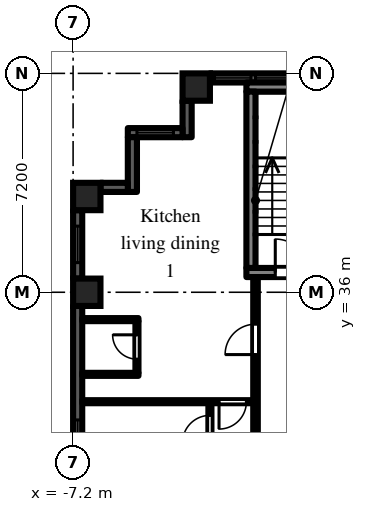
"""IFC4 building model, lengths in metres.
Left out: names, types, materials, properties, quantities, classifications, styles, units other than length and angle.
Written with IfcOpenShell. Run it as: python <this file> out.ifc"""

import sys

from ifc_helpers import new_model, si_unit, direction, frame, frame_2d, origin, origin_2d, place, context, subcontext, project, spatial, rectangle, extrude, element, fill, save


model = new_model("IFC4")
c1 = context("Model", 3, precision=1e-05, world=origin(), true_north=direction((0.0, 1.0)))
c2 = subcontext(c1, "Body", "Model", "MODEL_VIEW")
j1 = project(units=[si_unit("LENGTHUNIT", "METRE"), si_unit("PLANEANGLEUNIT", "RADIAN")], contexts=[c1])
p1 = place(None, origin())
s1 = spatial("IfcSite", under=j1, at=p1, CompositionType="ELEMENT")
p2 = place(p1, origin())
s2 = spatial("IfcBuilding", under=s1, at=p2, CompositionType="ELEMENT")
p3 = place(p2, frame((0.0, 0.0, 29.7)))
s3 = spatial("IfcBuildingStorey", under=s2, at=p3, CompositionType="ELEMENT", Elevation=29.7)
for number, where, z_axis, x_axis in (
    (1, (-6.75, 36.0, 0.0), (0.0, 0.0, 1.0), (1.0, 0.0, 0.0)),
    (2, (-6.75, 39.15, 0.0), (0.0, 0.0, 1.0), (1.0, 0.0, 0.0)),
    (3, (-3.15, 42.75, 0.0), (0.0, 0.0, 1.0), (1.0, 0.0, 0.0)),
):
    element("IfcColumn", number, at=place(p3, frame(where, z_axis=z_axis, x_axis=x_axis)), inside=s3, PredefinedType="COLUMN", context=c2, shape_type="SweptSolid", body=[
        extrude(rectangle(XDim=0.9, YDim=0.9, at=origin_2d()), origin(), (0.0, 0.0, 1.0), 3.0),
    ])
p4 = place(p3, frame((2.7, 43.05, 0.0), z_axis=(0.0, 0.0, 1.0), x_axis=(-1.0, 0.0, 0.0)))
e4 = element("IfcWall", 4, at=p4, inside=s3, PredefinedType="SOLIDWALL", context=c2, shape_type="SweptSolid", body=[
    extrude(rectangle(XDim=5.4, YDim=0.3, at=frame_2d((2.7, 0.0))), origin(), (0.0, 0.0, 1.0), 2.1),
])
p5 = place(p4, frame((1.5, 0.0, 0.2)))
e5 = element("IfcOpeningElement", 5, at=p5, cuts=e4, PredefinedType="OPENING", context=c2, shape_type="SweptSolid", body=[
    extrude(rectangle(XDim=2.4, YDim=1.85, at=frame_2d((1.2, 0.925))), frame((0.0, 0.16, 0.0), z_axis=(0.0, -1.0, 0.0), x_axis=(1.0, 0.0, 0.0)), (0.0, 0.0, 1.0), 0.32),
])
p6 = place(p4, frame((0.15, 0.0, 0.2)))
e6 = element("IfcOpeningElement", 6, at=p6, cuts=e4, PredefinedType="OPENING", context=c2, shape_type="SweptSolid", body=[
    extrude(rectangle(XDim=1.2, YDim=1.85, at=frame_2d((0.6, 0.925))), frame((0.0, 0.16, 0.0), z_axis=(0.0, -1.0, 0.0), x_axis=(1.0, 0.0, 0.0)), (0.0, 0.0, 1.0), 0.32),
])
p7 = place(p4, frame((4.05, 0.0, 0.2)))
e7 = element("IfcOpeningElement", 7, at=p7, cuts=e4, PredefinedType="OPENING", context=c2, shape_type="SweptSolid", body=[
    extrude(rectangle(XDim=1.2, YDim=1.85, at=frame_2d((0.6, 0.925))), frame((0.0, 0.16, 0.0), z_axis=(0.0, -1.0, 0.0), x_axis=(1.0, 0.0, 0.0)), (0.0, 0.0, 1.0), 0.32),
])
p8 = place(p3, frame((-3.45, 42.3, 0.0), z_axis=(0.0, 0.0, 1.0), x_axis=(0.0, -1.0, 0.0)))
e8 = element("IfcWall", 8, at=p8, inside=s3, PredefinedType="SOLIDWALL", context=c2, shape_type="SweptSolid", body=[
    extrude(rectangle(XDim=1.2, YDim=0.3, at=frame_2d((0.6, 0.0))), origin(), (0.0, 0.0, 1.0), 2.575),
])
p9 = place(p3, frame((-3.6, 41.25, 0.0), z_axis=(0.0, 0.0, 1.0), x_axis=(-1.0, 0.0, 0.0)))
e9 = element("IfcWall", 9, at=p9, inside=s3, PredefinedType="SOLIDWALL", context=c2, shape_type="SweptSolid", body=[
    extrude(rectangle(XDim=1.8, YDim=0.3, at=frame_2d((0.9, 0.0))), origin(), (0.0, 0.0, 1.0), 2.575),
])
p10 = place(p9, frame((0.3, 0.0, 0.2)))
e10 = element("IfcOpeningElement", 10, at=p10, cuts=e9, PredefinedType="OPENING", context=c2, shape_type="SweptSolid", body=[
    extrude(rectangle(XDim=1.2, YDim=1.85, at=frame_2d((0.6, 0.925))), frame((0.0, 0.16, 0.0), z_axis=(0.0, -1.0, 0.0), x_axis=(1.0, 0.0, 0.0)), (0.0, 0.0, 1.0), 0.32),
])
p11 = place(p3, frame((-5.25, 41.1, 0.0), z_axis=(0.0, 0.0, 1.0), x_axis=(0.0, -1.0, 0.0)))
e11 = element("IfcWall", 11, at=p11, inside=s3, PredefinedType="SOLIDWALL", context=c2, shape_type="SweptSolid", body=[
    extrude(rectangle(XDim=1.8, YDim=0.3, at=frame_2d((0.9, 0.0))), origin(), (0.0, 0.0, 1.0), 2.575),
])
p12 = place(p3, frame((-5.4, 39.45, 0.0), z_axis=(0.0, 0.0, 1.0), x_axis=(-1.0, 0.0, 0.0)))
e12 = element("IfcWall", 12, at=p12, inside=s3, PredefinedType="SOLIDWALL", context=c2, shape_type="SweptSolid", body=[
    extrude(rectangle(XDim=0.9, YDim=0.3, at=frame_2d((0.45, 0.0))), origin(), (0.0, 0.0, 1.0), 2.575),
])
p13 = place(p3, frame((-7.05, 38.7, 0.0), z_axis=(0.0, 0.0, 1.0), x_axis=(0.0, -1.0, 0.0)))
e13 = element("IfcWall", 13, at=p13, inside=s3, PredefinedType="SOLIDWALL", context=c2, shape_type="SweptSolid", body=[
    extrude(rectangle(XDim=2.25, YDim=0.3, at=frame_2d((1.125, 0.0))), origin(), (0.0, 0.0, 1.0), 2.1),
])
p14 = place(p13, frame((0.525, 0.0, 0.2)))
e14 = element("IfcOpeningElement", 14, at=p14, cuts=e13, PredefinedType="OPENING", context=c2, shape_type="SweptSolid", body=[
    extrude(rectangle(XDim=1.2, YDim=1.85, at=frame_2d((0.6, 0.925))), frame((0.0, 0.16, 0.0), z_axis=(0.0, -1.0, 0.0), x_axis=(1.0, 0.0, 0.0)), (0.0, 0.0, 1.0), 0.32),
])
p15 = place(p3, frame((-7.05, 35.55, 0.0), z_axis=(0.0, 0.0, 1.0), x_axis=(0.0, -1.0, 0.0)))
e15 = element("IfcWall", 15, at=p15, inside=s3, PredefinedType="SOLIDWALL", context=c2, shape_type="SweptSolid", body=[
    extrude(rectangle(XDim=6.3, YDim=0.3, at=frame_2d((3.15, 0.0))), origin(), (0.0, 0.0, 1.0), 2.1),
])
p16 = place(p15, frame((3.75, 0.0, 0.2)))
e16 = element("IfcOpeningElement", 16, at=p16, cuts=e15, PredefinedType="OPENING", context=c2, shape_type="SweptSolid", body=[
    extrude(rectangle(XDim=2.4, YDim=1.85, at=frame_2d((1.2, 0.925))), frame((0.0, 0.16, 0.0), z_axis=(0.0, -1.0, 0.0), x_axis=(1.0, 0.0, 0.0)), (0.0, 0.0, 1.0), 0.32),
])
p17 = place(p3, frame((-1.5, 36.65, 0.0), z_axis=(0.0, 0.0, 1.0), x_axis=(1.0, 0.0, 0.0)))
e17 = element("IfcWall", 17, at=p17, inside=s3, PredefinedType="SHEAR", context=c2, shape_type="SweptSolid", body=[
    extrude(rectangle(XDim=3.0, YDim=0.3, at=frame_2d((1.5, 0.0))), origin(), (0.0, 0.0, 1.0), 2.575),
])
p18 = place(p17, frame((0.95, 0.0, 0.0)))
e18 = element("IfcOpeningElement", 18, at=p18, cuts=e17, PredefinedType="OPENING", context=c2, shape_type="SweptSolid", body=[
    extrude(rectangle(XDim=1.1, YDim=2.1, at=frame_2d((0.55, 1.05))), frame((0.0, 0.16, 0.0), z_axis=(0.0, -1.0, 0.0), x_axis=(1.0, 0.0, 0.0)), (0.0, 0.0, 1.0), 0.32),
])
p19 = place(p3, frame((-1.5, 42.75, 0.0), z_axis=(0.0, 0.0, 1.0), x_axis=(1.0, 0.0, 0.0)))
e19 = element("IfcWall", 19, at=p19, inside=s3, PredefinedType="SHEAR", context=c2, shape_type="SweptSolid", body=[
    extrude(rectangle(XDim=3.0, YDim=0.3, at=frame_2d((1.5, 0.0))), origin(), (0.0, 0.0, 1.0), 2.575),
])
p20 = place(p3, frame((-1.35, 36.8, 0.0), z_axis=(0.0, 0.0, 1.0), x_axis=(0.0, 1.0, 0.0)))
e20 = element("IfcWall", 20, at=p20, inside=s3, PredefinedType="SHEAR", context=c2, shape_type="SweptSolid", body=[
    extrude(rectangle(XDim=5.8, YDim=0.3, at=frame_2d((2.9, 0.0))), origin(), (0.0, 0.0, 1.0), 2.575),
])
p21 = place(p3, frame((-6.9, 32.4, 0.0), z_axis=(0.0, 0.0, 1.0), x_axis=(1.0, 0.0, 0.0)))
e21 = element("IfcWall", 21, at=p21, inside=s3, PredefinedType="PARTITIONING", context=c2, shape_type="SweptSolid", body=[
    extrude(rectangle(XDim=5.625, YDim=0.1, at=frame_2d((2.812, 0.0))), origin(), (0.0, 0.0, 1.0), 2.575),
])
p22 = place(p21, frame((4.5, 0.0, 0.0)))
e22 = element("IfcOpeningElement", 22, at=p22, cuts=e21, PredefinedType="OPENING", context=c2, shape_type="SweptSolid", body=[
    extrude(rectangle(XDim=0.9, YDim=2.1, at=frame_2d((0.45, 1.05))), frame((0.0, 0.06, 0.0), z_axis=(0.0, -1.0, 0.0), x_axis=(1.0, 0.0, 0.0)), (0.0, 0.0, 1.0), 0.12),
])
for number, where, z_axis, x_axis in (
    (23, (-6.9, 33.3, 0.0), (0.0, 0.0, 1.0), (1.0, 0.0, 0.0)),
    (24, (-6.9, 35.1, 0.0), (0.0, 0.0, 1.0), (1.0, 0.0, 0.0)),
):
    element("IfcWall", number, at=place(p3, frame(where, z_axis=z_axis, x_axis=x_axis)), inside=s3, PredefinedType="PARTITIONING", context=c2, shape_type="SweptSolid", body=[
        extrude(rectangle(XDim=1.85, YDim=0.1, at=frame_2d((0.925, 0.0))), origin(), (0.0, 0.0, 1.0), 2.575),
    ])
p23 = place(p3, frame((-5.1, 33.35, 0.0), z_axis=(0.0, 0.0, 1.0), x_axis=(0.0, 1.0, 0.0)))
e25 = element("IfcWall", 25, at=p23, inside=s3, PredefinedType="PARTITIONING", context=c2, shape_type="SweptSolid", body=[
    extrude(rectangle(XDim=1.7, YDim=0.1, at=frame_2d((0.85, 0.0))), origin(), (0.0, 0.0, 1.0), 2.575),
])
p24 = place(p23, frame((0.45, 0.0, 0.0)))
e26 = element("IfcOpeningElement", 26, at=p24, cuts=e25, PredefinedType="OPENING", context=c2, shape_type="SweptSolid", body=[
    extrude(rectangle(XDim=0.8, YDim=2.1, at=frame_2d((0.4, 1.05))), frame((0.0, 0.06, 0.0), z_axis=(0.0, -1.0, 0.0), x_axis=(1.0, 0.0, 0.0)), (0.0, 0.0, 1.0), 0.12),
])
p25 = place(p3, frame((-2.7, 18.05, 0.0), z_axis=(0.0, 0.0, 1.0), x_axis=(0.0, 1.0, 0.0)))
e27 = element("IfcWall", 27, at=p25, inside=s3, PredefinedType="PARTITIONING", context=c2, shape_type="SweptSolid", body=[
    extrude(rectangle(XDim=14.3, YDim=0.1, at=frame_2d((7.15, 0.0))), origin(), (0.0, 0.0, 1.0), 2.575),
])
p26 = place(p25, frame((0.4, 0.0, 0.0)))
e28 = element("IfcOpeningElement", 28, at=p26, cuts=e27, PredefinedType="OPENING", context=c2, shape_type="SweptSolid", body=[
    extrude(rectangle(XDim=0.9, YDim=2.1, at=frame_2d((0.45, 1.05))), frame((0.0, 0.06, 0.0), z_axis=(0.0, -1.0, 0.0), x_axis=(1.0, 0.0, 0.0)), (0.0, 0.0, 1.0), 0.12),
])
p27 = place(p25, frame((5.8, 0.0, 0.0)))
e29 = element("IfcOpeningElement", 29, at=p27, cuts=e27, PredefinedType="OPENING", context=c2, shape_type="SweptSolid", body=[
    extrude(rectangle(XDim=0.9, YDim=2.1, at=frame_2d((0.45, 1.05))), frame((0.0, 0.06, 0.0), z_axis=(0.0, -1.0, 0.0), x_axis=(1.0, 0.0, 0.0)), (0.0, 0.0, 1.0), 0.12),
])
p28 = place(p25, frame((7.6, 0.0, 0.0)))
e30 = element("IfcOpeningElement", 30, at=p28, cuts=e27, PredefinedType="OPENING", context=c2, shape_type="SweptSolid", body=[
    extrude(rectangle(XDim=0.9, YDim=2.1, at=frame_2d((0.45, 1.05))), frame((0.0, 0.06, 0.0), z_axis=(0.0, -1.0, 0.0), x_axis=(1.0, 0.0, 0.0)), (0.0, 0.0, 1.0), 0.12),
])
p29 = place(p25, frame((13.0, 0.0, 0.0)))
e31 = element("IfcOpeningElement", 31, at=p29, cuts=e27, PredefinedType="OPENING", context=c2, shape_type="SweptSolid", body=[
    extrude(rectangle(XDim=0.9, YDim=2.1, at=frame_2d((0.45, 1.05))), frame((0.0, 0.06, 0.0), z_axis=(0.0, -1.0, 0.0), x_axis=(1.0, 0.0, 0.0)), (0.0, 0.0, 1.0), 0.12),
])
p30 = place(p3, frame((-1.2, 1.125, 0.0), z_axis=(0.0, 0.0, 1.0), x_axis=(0.0, 1.0, 0.0)))
e32 = element("IfcWall", 32, at=p30, inside=s3, PredefinedType="PARTITIONING", context=c2, shape_type="SweptSolid", body=[
    extrude(rectangle(XDim=35.375, YDim=0.15, at=frame_2d((17.688, 0.0))), origin(), (0.0, 0.0, 1.0), 2.575),
])
p31 = place(p30, frame((2.625, 0.0, 0.0)))
e33 = element("IfcOpeningElement", 33, at=p31, cuts=e32, PredefinedType="OPENING", context=c2, shape_type="SweptSolid", body=[
    extrude(rectangle(XDim=0.9, YDim=2.1, at=frame_2d((0.45, 1.05))), frame((0.0, 0.085, 0.0), z_axis=(0.0, -1.0, 0.0), x_axis=(1.0, 0.0, 0.0)), (0.0, 0.0, 1.0), 0.17),
])
p32 = place(p30, frame((11.025, 0.0, 0.0)))
e34 = element("IfcOpeningElement", 34, at=p32, cuts=e32, PredefinedType="OPENING", context=c2, shape_type="SweptSolid", body=[
    extrude(rectangle(XDim=0.9, YDim=2.1, at=frame_2d((0.45, 1.05))), frame((0.0, 0.085, 0.0), z_axis=(0.0, -1.0, 0.0), x_axis=(1.0, 0.0, 0.0)), (0.0, 0.0, 1.0), 0.17),
])
p33 = place(p30, frame((14.625, 0.0, 0.0)))
e35 = element("IfcOpeningElement", 35, at=p33, cuts=e32, PredefinedType="OPENING", context=c2, shape_type="SweptSolid", body=[
    extrude(rectangle(XDim=0.9, YDim=2.1, at=frame_2d((0.45, 1.05))), frame((0.0, 0.085, 0.0), z_axis=(0.0, -1.0, 0.0), x_axis=(1.0, 0.0, 0.0)), (0.0, 0.0, 1.0), 0.17),
])
p34 = place(p30, frame((32.825, 0.0, 0.0)))
e36 = element("IfcOpeningElement", 36, at=p34, cuts=e32, PredefinedType="OPENING", context=c2, shape_type="SweptSolid", body=[
    extrude(rectangle(XDim=1.0, YDim=2.1, at=frame_2d((0.5, 1.05))), frame((0.0, 0.085, 0.0), z_axis=(0.0, -1.0, 0.0), x_axis=(1.0, 0.0, 0.0)), (0.0, 0.0, 1.0), 0.17),
])
p35 = place(p5, origin())
e37 = element("IfcWindow", 37, at=p35, inside=s3, PartitioningType="SINGLE_PANEL", PredefinedType="WINDOW", context=c2, shape_type="SweptSolid", body=[
    extrude(rectangle(XDim=2.4, YDim=1.85, at=frame_2d((1.2, 0.925))), frame((0.0, 0.03, 0.0), z_axis=(0.0, -1.0, 0.0), x_axis=(1.0, 0.0, 0.0)), (0.0, 0.0, 1.0), 0.06),
])
fill(e5, e37)
p36 = place(p7, origin())
e38 = element("IfcWindow", 38, at=p36, inside=s3, PartitioningType="SINGLE_PANEL", PredefinedType="WINDOW", context=c2, shape_type="SweptSolid", body=[
    extrude(rectangle(XDim=1.2, YDim=1.85, at=frame_2d((0.6, 0.925))), frame((0.0, 0.03, 0.0), z_axis=(0.0, -1.0, 0.0), x_axis=(1.0, 0.0, 0.0)), (0.0, 0.0, 1.0), 0.06),
])
fill(e7, e38)
p37 = place(p10, origin())
e39 = element("IfcWindow", 39, at=p37, inside=s3, PartitioningType="SINGLE_PANEL", PredefinedType="WINDOW", context=c2, shape_type="SweptSolid", body=[
    extrude(rectangle(XDim=1.2, YDim=1.85, at=frame_2d((0.6, 0.925))), frame((0.0, 0.03, 0.0), z_axis=(0.0, -1.0, 0.0), x_axis=(1.0, 0.0, 0.0)), (0.0, 0.0, 1.0), 0.06),
])
fill(e10, e39)
p38 = place(p14, origin())
e40 = element("IfcWindow", 40, at=p38, inside=s3, PartitioningType="SINGLE_PANEL", PredefinedType="WINDOW", context=c2, shape_type="SweptSolid", body=[
    extrude(rectangle(XDim=1.2, YDim=1.85, at=frame_2d((0.6, 0.925))), frame((0.0, 0.03, 0.0), z_axis=(0.0, -1.0, 0.0), x_axis=(1.0, 0.0, 0.0)), (0.0, 0.0, 1.0), 0.06),
])
fill(e14, e40)
p39 = place(p16, origin())
e41 = element("IfcWindow", 41, at=p39, inside=s3, PartitioningType="SINGLE_PANEL", PredefinedType="WINDOW", context=c2, shape_type="SweptSolid", body=[
    extrude(rectangle(XDim=2.4, YDim=1.85, at=frame_2d((1.2, 0.925))), frame((0.0, 0.03, 0.0), z_axis=(0.0, -1.0, 0.0), x_axis=(1.0, 0.0, 0.0)), (0.0, 0.0, 1.0), 0.06),
])
fill(e16, e41)
p40 = place(p18, origin())
e42 = element("IfcDoor", 42, at=p40, inside=s3, OperationType="SINGLE_SWING_LEFT", PredefinedType="DOOR", context=c2, shape_type="SweptSolid", body=[
    extrude(rectangle(XDim=1.1, YDim=2.1, at=frame_2d((0.55, 1.05))), frame((0.0, 0.025, 0.0), z_axis=(0.0, -1.0, 0.0), x_axis=(1.0, 0.0, 0.0)), (0.0, 0.0, 1.0), 0.05),
])
fill(e18, e42)
p41 = place(p24, origin())
e43 = element("IfcDoor", 43, at=p41, inside=s3, OperationType="SINGLE_SWING_RIGHT", PredefinedType="DOOR", context=c2, shape_type="SweptSolid", body=[
    extrude(rectangle(XDim=0.8, YDim=2.1, at=frame_2d((0.4, 1.05))), frame((0.0, 0.025, 0.0), z_axis=(0.0, -1.0, 0.0), x_axis=(1.0, 0.0, 0.0)), (0.0, 0.0, 1.0), 0.05),
])
fill(e26, e43)
p42 = place(p34, origin())
e44 = element("IfcDoor", 44, at=p42, inside=s3, OperationType="SINGLE_SWING_LEFT", PredefinedType="DOOR", context=c2, shape_type="SweptSolid", body=[
    extrude(rectangle(XDim=1.0, YDim=2.1, at=frame_2d((0.5, 1.05))), frame((0.0, 0.025, 0.0), z_axis=(0.0, -1.0, 0.0), x_axis=(1.0, 0.0, 0.0)), (0.0, 0.0, 1.0), 0.05),
])
fill(e36, e44)
p43 = place(p29, origin())
e45 = element("IfcDoor", 45, at=p43, inside=s3, OperationType="SINGLE_SWING_LEFT", PredefinedType="DOOR", context=c2, shape_type="SweptSolid", body=[
    extrude(rectangle(XDim=0.9, YDim=2.1, at=frame_2d((0.45, 1.05))), frame((0.0, 0.025, 0.0), z_axis=(0.0, -1.0, 0.0), x_axis=(1.0, 0.0, 0.0)), (0.0, 0.0, 1.0), 0.05),
])
fill(e31, e45)
p44 = place(p22, frame((0.9, 0.0, 0.0), z_axis=(0.0, 0.0, 1.0), x_axis=(-1.0, 0.0, 0.0)))
e46 = element("IfcDoor", 46, at=p44, inside=s3, OperationType="SINGLE_SWING_RIGHT", PredefinedType="DOOR", context=c2, shape_type="SweptSolid", body=[
    extrude(rectangle(XDim=0.9, YDim=2.1, at=frame_2d((0.45, 1.05))), frame((0.0, 0.025, 0.0), z_axis=(0.0, -1.0, 0.0), x_axis=(1.0, 0.0, 0.0)), (0.0, 0.0, 1.0), 0.05),
])
fill(e22, e46)
save(model, sys.argv[1])
